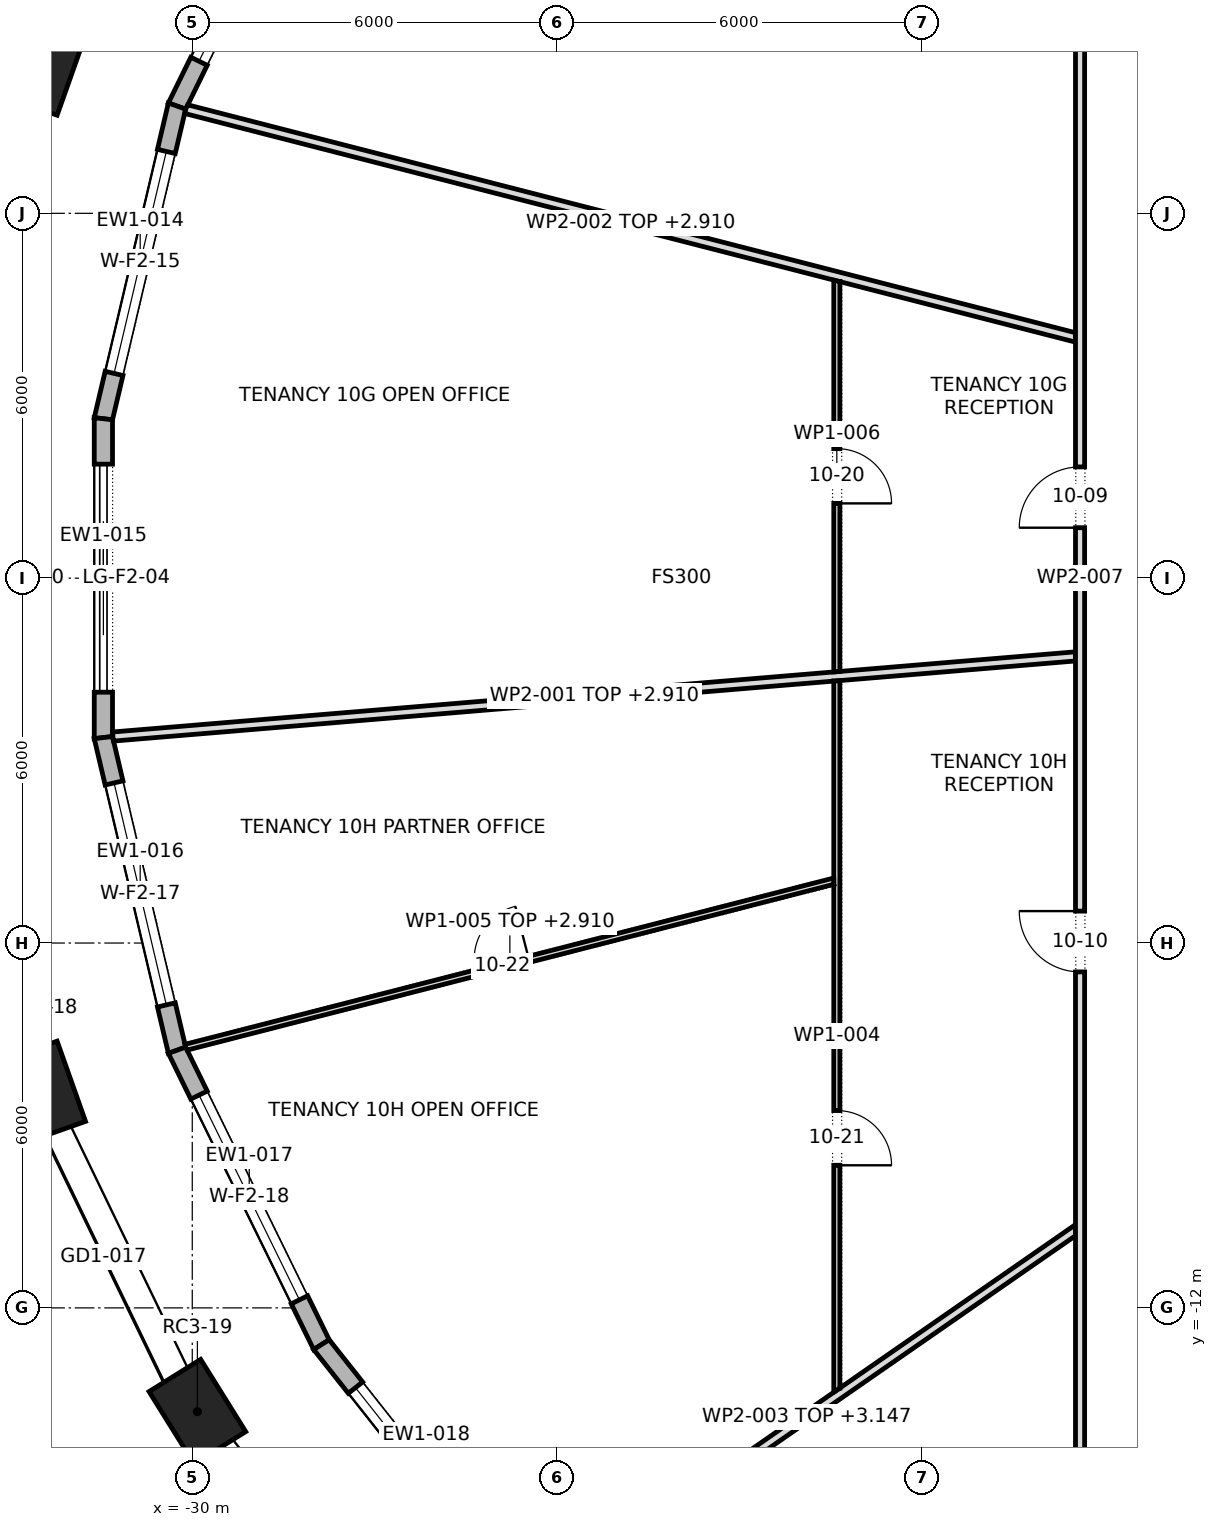
"""IFC4 building model, lengths in metres.
Left out: names, types, materials, properties, quantities, classifications, styles, units other than length and angle.
Written with IfcOpenShell. Run it as: python <this file> out.ifc"""

import sys

from ifc_helpers import new_model, si_unit, direction, frame, frame_2d, origin, origin_2d, place, context, subcontext, project, spatial, polyline, rectangle, outline, extrude, element, fill, save


model = new_model("IFC4")
c1 = context("Model", 3, precision=1e-05, world=origin(), true_north=direction((0.0, 1.0)))
c2 = subcontext(c1, "Body", "Model", "MODEL_VIEW")
j1 = project(units=[si_unit("LENGTHUNIT", "METRE"), si_unit("PLANEANGLEUNIT", "RADIAN")], contexts=[c1])
p1 = place(None, origin())
s1 = spatial("IfcSite", under=j1, at=p1, CompositionType="ELEMENT")
p2 = place(p1, origin())
s2 = spatial("IfcBuilding", under=s1, at=p2, CompositionType="ELEMENT")
p3 = place(p2, frame((0.0, 0.0, 150.7)))
s3 = spatial("IfcBuildingStorey", under=s2, at=p3, CompositionType="ELEMENT", Elevation=150.7)
for number, where, z_axis, x_axis in (
    (1, (-32.46, 8.44, 0.0), (0.0, 0.0, 1.0), (-0.334, -0.943, 0.0)),
    (2, (-32.46, -8.44, 0.0), (0.0, 0.0, 1.0), (0.334, -0.943, 0.0)),
    (3, (-29.916, -13.706, 0.0), (0.0, 0.0, 1.0), (0.529, -0.849, 0.0)),
):
    element("IfcColumn", number, at=place(p3, frame(where, z_axis=z_axis, x_axis=x_axis)), inside=s3, PredefinedType="COLUMN", context=c2, shape_type="SweptSolid", body=[
        extrude(rectangle(XDim=1.4, YDim=1.0, at=origin_2d()), origin(), (0.0, 0.0, 1.0), 4.2),
    ])
p4 = place(p3, frame((-27.876, 12.605, 0.0), z_axis=(0.0, 0.0, 1.0), x_axis=(-0.440373354088, -0.897814740918, 0.0)))
e4 = element("IfcWall", 4, at=p4, inside=s3, PredefinedType="STANDARD", context=c2, shape_type="SweptSolid", body=[
    extrude(outline(polyline([(-0.016, -0.15), (5.409, -0.15), (5.376, 0.15), (0.016, 0.15), (-0.016, -0.15)])), origin(), (0.0, 0.0, 1.0), 3.9),
])
p5 = place(p4, frame((0.821, 0.0, 0.6)))
e5 = element("IfcOpeningElement", 5, at=p5, cuts=e4, PredefinedType="OPENING", context=c2, shape_type="SweptSolid", body=[
    extrude(rectangle(XDim=3.75, YDim=2.85, at=frame_2d((1.875, 1.425))), frame((0.0, 0.162, 0.0), z_axis=(0.0, -1.0, 0.0), x_axis=(1.0, 0.0, 0.0)), (0.0, 0.0, 1.0), 0.324),
])
p6 = place(p3, frame((-30.25, 7.763, 0.0), z_axis=(0.0, 0.0, 1.0), x_axis=(-0.229289208312, -0.973358340464, 0.0)))
e6 = element("IfcWall", 6, at=p6, inside=s3, PredefinedType="STANDARD", context=c2, shape_type="SweptSolid", body=[
    extrude(outline(polyline([(-0.017, -0.15), (5.3, -0.15), (5.265, 0.15), (0.017, 0.15), (-0.017, -0.15)])), origin(), (0.0, 0.0, 1.0), 3.9),
])
p7 = place(p6, frame((0.766, 0.0, 0.6)))
e7 = element("IfcOpeningElement", 7, at=p7, cuts=e6, PredefinedType="OPENING", context=c2, shape_type="SweptSolid", body=[
    extrude(rectangle(XDim=3.75, YDim=2.85, at=frame_2d((1.875, 1.425))), frame((0.0, 0.162, 0.0), z_axis=(0.0, -1.0, 0.0), x_axis=(1.0, 0.0, 0.0)), (0.0, 0.0, 1.0), 0.324),
])
p8 = place(p3, frame((-31.462, 2.622, 0.0), z_axis=(0.0, 0.0, 1.0), x_axis=(0.0, -1.0, 0.0)))
e8 = element("IfcWall", 8, at=p8, inside=s3, PredefinedType="STANDARD", context=c2, shape_type="SweptSolid", body=[
    extrude(outline(polyline([(-0.017, -0.15), (5.26, -0.15), (5.226, 0.15), (0.017, 0.15), (-0.017, -0.15)])), origin(), (0.0, 0.0, 1.0), 3.9),
])
p9 = place(p8, frame((0.747, 0.0, 0.0)))
e9 = element("IfcOpeningElement", 9, at=p9, cuts=e8, PredefinedType="OPENING", context=c2, shape_type="SweptSolid", body=[
    extrude(rectangle(XDim=3.75, YDim=3.45, at=frame_2d((1.875, 1.725))), frame((0.0, 0.162, 0.0), z_axis=(0.0, -1.0, 0.0), x_axis=(1.0, 0.0, 0.0)), (0.0, 0.0, 1.0), 0.324),
])
p10 = place(p3, frame((-31.462, -2.622, 0.0), z_axis=(0.0, 0.0, 1.0), x_axis=(0.229289208312, -0.973358340464, 0.0)))
e10 = element("IfcWall", 10, at=p10, inside=s3, PredefinedType="STANDARD", context=c2, shape_type="SweptSolid", body=[
    extrude(outline(polyline([(-0.017, -0.15), (5.299, -0.15), (5.265, 0.15), (0.017, 0.15), (-0.017, -0.15)])), origin(), (0.0, 0.0, 1.0), 3.9),
])
p11 = place(p10, frame((0.766, 0.0, 0.6)))
e11 = element("IfcOpeningElement", 11, at=p11, cuts=e10, PredefinedType="OPENING", context=c2, shape_type="SweptSolid", body=[
    extrude(rectangle(XDim=3.75, YDim=2.85, at=frame_2d((1.875, 1.425))), frame((0.0, 0.162, 0.0), z_axis=(0.0, -1.0, 0.0), x_axis=(1.0, 0.0, 0.0)), (0.0, 0.0, 1.0), 0.324),
])
p12 = place(p3, frame((-30.25, -7.763, 0.0), z_axis=(0.0, 0.0, 1.0), x_axis=(0.440373354088, -0.897814740918, 0.0)))
e12 = element("IfcWall", 12, at=p12, inside=s3, PredefinedType="STANDARD", context=c2, shape_type="SweptSolid", body=[
    extrude(outline(polyline([(-0.017, -0.15), (5.409, -0.15), (5.376, 0.15), (0.017, 0.15), (-0.017, -0.15)])), origin(), (0.0, 0.0, 1.0), 3.9),
])
p13 = place(p12, frame((0.821, 0.0, 0.6)))
e13 = element("IfcOpeningElement", 13, at=p13, cuts=e12, PredefinedType="OPENING", context=c2, shape_type="SweptSolid", body=[
    extrude(rectangle(XDim=3.75, YDim=2.85, at=frame_2d((1.875, 1.425))), frame((0.0, 0.162, 0.0), z_axis=(0.0, -1.0, 0.0), x_axis=(1.0, 0.0, 0.0)), (0.0, 0.0, 1.0), 0.324),
])
p14 = place(p3, frame((-27.876, -12.605, 0.0), z_axis=(0.0, 0.0, 1.0), x_axis=(0.620520511988, -0.784190215574, 0.0)))
e14 = element("IfcWall", 14, at=p14, inside=s3, PredefinedType="STANDARD", context=c2, shape_type="SweptSolid", body=[
    extrude(outline(polyline([(-0.016, -0.15), (5.569, -0.15), (5.538, 0.15), (0.016, 0.15), (-0.016, -0.15)])), origin(), (0.0, 0.0, 1.0), 3.9),
])
p15 = place(p14, frame((0.902, 0.0, 0.6)))
e15 = element("IfcOpeningElement", 15, at=p15, cuts=e14, PredefinedType="OPENING", context=c2, shape_type="SweptSolid", body=[
    extrude(rectangle(XDim=3.75, YDim=2.85, at=frame_2d((1.875, 1.425))), frame((0.0, 0.162, 0.0), z_axis=(0.0, -1.0, 0.0), x_axis=(1.0, 0.0, 0.0)), (0.0, 0.0, 1.0), 0.324),
])
p16 = place(p3, frame((-31.305, -2.604, 0.0), z_axis=(0.0, 0.0, 1.0), x_axis=(0.996551160003, 0.082980633261, 0.0)))
e16 = element("IfcWall", 16, at=p16, inside=s3, PredefinedType="PARTITIONING", context=c2, shape_type="SweptSolid", body=[
    extrude(outline(polyline([(0.005, -0.075), (1.985, -0.075), (3.966, -0.075), (5.947, -0.075), (7.928, -0.075), (9.909, -0.075), (11.89, -0.075), (11.89, -0.075), (11.891, -0.075), (13.885, -0.075), (15.878, -0.075), (15.89, 0.068), (15.89, 0.075), (13.904, 0.075), (11.918, 0.075), (9.931, 0.075), (7.945, 0.075), (5.959, 0.075), (3.973, 0.075), (1.986, 0.075), (0.0, 0.075), (0.0, -0.044), (0.005, -0.075)])), origin(), (0.0, 0.0, 1.0), 2.91),
])
p17 = place(p3, frame((-30.106, 7.715, 0.0), z_axis=(0.0, 0.0, 1.0), x_axis=(0.968604188178, -0.248607977837, 0.0)))
e17 = element("IfcWall", 17, at=p17, inside=s3, PredefinedType="PARTITIONING", context=c2, shape_type="SweptSolid", body=[
    extrude(outline(polyline([(0.0, -0.075), (1.853, -0.075), (3.707, -0.075), (5.56, -0.075), (7.413, -0.075), (9.267, -0.075), (11.12, -0.075), (11.124, -0.074), (11.124, -0.075), (12.458, -0.075), (13.791, -0.075), (15.124, -0.075), (15.124, -0.073), (15.086, 0.075), (13.202, 0.075), (11.318, 0.075), (9.434, 0.075), (7.55, 0.075), (5.667, 0.075), (3.782, 0.075), (1.898, 0.075), (0.015, 0.075), (0.0, 0.005), (0.0, -0.075)])), origin(), (0.0, 0.0, 1.0), 2.91),
])
p18 = place(p3, frame((-24.324, -16.859, 0.0), z_axis=(0.0, 0.0, 1.0), x_axis=(0.821700462415, 0.569919599652, 0.0)))
e18 = element("IfcWall", 18, at=p18, inside=s3, PredefinedType="PARTITIONING", context=c2, shape_type="SweptSolid", body=[
    extrude(outline(polyline([(0.025, -0.075), (1.807, -0.075), (3.589, -0.075), (5.371, -0.075), (7.153, -0.075), (8.935, -0.075), (10.717, -0.075), (10.82, 0.074), (10.82, 0.075), (9.249, 0.075), (7.677, 0.075), (6.105, 0.075), (6.104, 0.073), (6.102, 0.075), (4.576, 0.075), (3.051, 0.075), (1.525, 0.075), (0.0, 0.075), (0.0, 0.071), (0.004, 0.002), (0.025, -0.075)])), origin(), (0.0, 0.0, 1.0), 3.147),
])
p19 = place(p3, frame((-19.4, -13.387, 0.0), z_axis=(0.0, 0.0, 1.0), x_axis=(0.0, 1.0, 0.0)))
e19 = element("IfcWall", 19, at=p19, inside=s3, PredefinedType="PARTITIONING", context=c2, shape_type="SweptSolid", body=[
    extrude(outline(polyline([(11.703, -0.05), (11.703, -0.046), (11.695, 0.05), (10.028, 0.05), (8.361, 0.05), (8.354, 0.048), (8.353, 0.05), (6.682, 0.05), (5.012, 0.05), (3.341, 0.05), (1.671, 0.05), (0.0, 0.05), (0.0, 0.05), (0.069, -0.05), (2.008, -0.05), (3.947, -0.05), (5.886, -0.05), (7.825, -0.05), (9.764, -0.05), (11.703, -0.05)])), origin(), (0.0, 0.0, 1.0), 3.9),
])
p20 = place(p19, frame((3.732, 0.0, 0.0)))
e20 = element("IfcOpeningElement", 20, at=p20, cuts=e19, PredefinedType="OPENING", context=c2, shape_type="SweptSolid", body=[
    extrude(rectangle(XDim=0.9, YDim=2.1, at=frame_2d((0.45, 1.05))), frame((0.0, 0.062, 0.0), z_axis=(0.0, -1.0, 0.0), x_axis=(1.0, 0.0, 0.0)), (0.0, 0.0, 1.0), 0.124),
])
p21 = place(p3, frame((-19.438, -4.98, 0.0), z_axis=(0.0, 0.0, 1.0), x_axis=(-0.968675214927, -0.248331085419, 0.0)))
e21 = element("IfcWall", 21, at=p21, inside=s3, PredefinedType="PARTITIONING", context=c2, shape_type="SweptSolid", body=[
    extrude(outline(polyline([(11.014, -0.05), (11.014, 0.002), (11.004, 0.05), (9.174, 0.05), (7.344, 0.05), (5.515, 0.05), (3.685, 0.05), (1.855, 0.05), (0.025, 0.05), (0.0, -0.049), (0.0, -0.05), (1.836, -0.05), (3.671, -0.05), (5.507, -0.05), (7.343, -0.05), (9.178, -0.05), (11.014, -0.05)])), origin(), (0.0, 0.0, 1.0), 2.91),
])
p22 = place(p21, frame((5.189, 0.0, 0.0)))
e22 = element("IfcOpeningElement", 22, at=p22, cuts=e21, PredefinedType="OPENING", context=c2, shape_type="SweptSolid", body=[
    extrude(rectangle(XDim=0.9, YDim=2.1, at=frame_2d((0.45, 1.05))), frame((0.0, 0.062, 0.0), z_axis=(0.0, -1.0, 0.0), x_axis=(1.0, 0.0, 0.0)), (0.0, 0.0, 1.0), 0.124),
])
p23 = place(p3, frame((-19.4, -1.542, 0.0), z_axis=(0.0, 0.0, 1.0), x_axis=(0.0, 1.0, 0.0)))
e23 = element("IfcWall", 23, at=p23, inside=s3, PredefinedType="PARTITIONING", context=c2, shape_type="SweptSolid", body=[
    extrude(outline(polyline([(0.008, -0.05), (1.611, -0.05), (3.213, -0.05), (4.816, -0.05), (6.418, -0.05), (6.444, 0.05), (4.833, 0.05), (3.222, 0.05), (1.611, 0.05), (0.0, 0.05), (0.0, 0.05), (0.008, -0.05)])), origin(), (0.0, 0.0, 1.0), 3.9),
])
p24 = place(p23, frame((2.772, 0.0, 0.0)))
e24 = element("IfcOpeningElement", 24, at=p24, cuts=e23, PredefinedType="OPENING", context=c2, shape_type="SweptSolid", body=[
    extrude(rectangle(XDim=0.9, YDim=2.1, at=frame_2d((0.45, 1.05))), frame((0.0, 0.062, 0.0), z_axis=(0.0, -1.0, 0.0), x_axis=(1.0, 0.0, 0.0)), (0.0, 0.0, 1.0), 0.124),
])
p25 = place(p3, frame((-15.4, -15.475, 0.0), z_axis=(0.0, 0.0, 1.0), x_axis=(0.0, 1.0, 0.0)))
e25 = element("IfcWall", 25, at=p25, inside=s3, PredefinedType="PARTITIONING", context=c2, shape_type="SweptSolid", body=[
    extrude(outline(polyline([(0.15, -0.075), (2.066, -0.075), (3.981, -0.075), (5.897, -0.075), (7.812, -0.075), (9.728, -0.075), (11.644, -0.075), (13.56, -0.075), (15.475, -0.075), (17.391, -0.075), (19.306, -0.075), (21.222, -0.075), (23.138, -0.075), (25.053, -0.075), (26.969, -0.075), (28.885, -0.075), (30.8, -0.075), (30.95, 0.075), (29.016, 0.075), (27.081, 0.075), (25.147, 0.075), (23.212, 0.075), (21.278, 0.075), (19.344, 0.075), (17.409, 0.075), (15.475, 0.075), (13.541, 0.075), (11.606, 0.075), (9.672, 0.075), (7.738, 0.075), (5.803, 0.075), (3.869, 0.075), (1.935, 0.075), (0.0, 0.075), (0.15, -0.075)])), origin(), (0.0, 0.0, 1.0), 3.9),
])
p26 = place(p25, frame((24.245, 0.0, 0.0)))
e26 = element("IfcOpeningElement", 26, at=p26, cuts=e25, PredefinedType="OPENING", context=c2, shape_type="SweptSolid", body=[
    extrude(rectangle(XDim=1.8, YDim=2.1, at=frame_2d((0.9, 1.05))), frame((0.0, 0.087, 0.0), z_axis=(0.0, -1.0, 0.0), x_axis=(1.0, 0.0, 0.0)), (0.0, 0.0, 1.0), 0.174),
])
p27 = place(p25, frame((16.305, 0.0, 0.0)))
e27 = element("IfcOpeningElement", 27, at=p27, cuts=e25, PredefinedType="OPENING", context=c2, shape_type="SweptSolid", body=[
    extrude(rectangle(XDim=1.0, YDim=2.1, at=frame_2d((0.5, 1.05))), frame((0.0, 0.087, 0.0), z_axis=(0.0, -1.0, 0.0), x_axis=(1.0, 0.0, 0.0)), (0.0, 0.0, 1.0), 0.174),
])
p28 = place(p25, frame((9.0, 0.0, 0.0)))
e28 = element("IfcOpeningElement", 28, at=p28, cuts=e25, PredefinedType="OPENING", context=c2, shape_type="SweptSolid", body=[
    extrude(rectangle(XDim=1.0, YDim=2.1, at=frame_2d((0.5, 1.05))), frame((0.0, 0.087, 0.0), z_axis=(0.0, -1.0, 0.0), x_axis=(1.0, 0.0, 0.0)), (0.0, 0.0, 1.0), 0.174),
])
p29 = place(p5, origin())
e29 = element("IfcWindow", 29, at=p29, inside=s3, PartitioningType="TRIPLE_PANEL_VERTICAL", PredefinedType="WINDOW", context=c2, shape_type="SweptSolid", body=[
    extrude(rectangle(XDim=3.75, YDim=2.85, at=frame_2d((1.875, 1.425))), frame((0.0, 0.03, 0.0), z_axis=(0.0, -1.0, 0.0), x_axis=(1.0, 0.0, 0.0)), (0.0, 0.0, 1.0), 0.06),
])
fill(e5, e29)
p30 = place(p7, origin())
e30 = element("IfcWindow", 30, at=p30, inside=s3, PartitioningType="TRIPLE_PANEL_VERTICAL", PredefinedType="WINDOW", context=c2, shape_type="SweptSolid", body=[
    extrude(rectangle(XDim=3.75, YDim=2.85, at=frame_2d((1.875, 1.425))), frame((0.0, 0.03, 0.0), z_axis=(0.0, -1.0, 0.0), x_axis=(1.0, 0.0, 0.0)), (0.0, 0.0, 1.0), 0.06),
])
fill(e7, e30)
p31 = place(p9, origin())
e31 = element("IfcDoor", 31, at=p31, inside=s3, OperationType="DOUBLE_DOOR_SLIDING", PredefinedType="DOOR", context=c2, shape_type="SweptSolid", body=[
    extrude(rectangle(XDim=3.75, YDim=3.45, at=frame_2d((1.875, 1.725))), frame((0.0, 0.025, 0.0), z_axis=(0.0, -1.0, 0.0), x_axis=(1.0, 0.0, 0.0)), (0.0, 0.0, 1.0), 0.05),
])
fill(e9, e31)
p32 = place(p11, origin())
e32 = element("IfcWindow", 32, at=p32, inside=s3, PartitioningType="TRIPLE_PANEL_VERTICAL", PredefinedType="WINDOW", context=c2, shape_type="SweptSolid", body=[
    extrude(rectangle(XDim=3.75, YDim=2.85, at=frame_2d((1.875, 1.425))), frame((0.0, 0.03, 0.0), z_axis=(0.0, -1.0, 0.0), x_axis=(1.0, 0.0, 0.0)), (0.0, 0.0, 1.0), 0.06),
])
fill(e11, e32)
p33 = place(p13, origin())
e33 = element("IfcWindow", 33, at=p33, inside=s3, PartitioningType="TRIPLE_PANEL_VERTICAL", PredefinedType="WINDOW", context=c2, shape_type="SweptSolid", body=[
    extrude(rectangle(XDim=3.75, YDim=2.85, at=frame_2d((1.875, 1.425))), frame((0.0, 0.03, 0.0), z_axis=(0.0, -1.0, 0.0), x_axis=(1.0, 0.0, 0.0)), (0.0, 0.0, 1.0), 0.06),
])
fill(e13, e33)
p34 = place(p15, origin())
e34 = element("IfcWindow", 34, at=p34, inside=s3, PartitioningType="TRIPLE_PANEL_VERTICAL", PredefinedType="WINDOW", context=c2, shape_type="SweptSolid", body=[
    extrude(rectangle(XDim=3.75, YDim=2.85, at=frame_2d((1.875, 1.425))), frame((0.0, 0.03, 0.0), z_axis=(0.0, -1.0, 0.0), x_axis=(1.0, 0.0, 0.0)), (0.0, 0.0, 1.0), 0.06),
])
fill(e15, e34)
p35 = place(p27, origin())
e35 = element("IfcDoor", 35, at=p35, inside=s3, OperationType="SINGLE_SWING_RIGHT", PredefinedType="DOOR", context=c2, shape_type="SweptSolid", body=[
    extrude(rectangle(XDim=1.0, YDim=2.1, at=frame_2d((0.5, 1.05))), frame((0.0, 0.025, 0.0), z_axis=(0.0, -1.0, 0.0), x_axis=(1.0, 0.0, 0.0)), (0.0, 0.0, 1.0), 0.05),
])
fill(e27, e35)
p36 = place(p28, origin())
e36 = element("IfcDoor", 36, at=p36, inside=s3, OperationType="SINGLE_SWING_LEFT", PredefinedType="DOOR", context=c2, shape_type="SweptSolid", body=[
    extrude(rectangle(XDim=1.0, YDim=2.1, at=frame_2d((0.5, 1.05))), frame((0.0, 0.025, 0.0), z_axis=(0.0, -1.0, 0.0), x_axis=(1.0, 0.0, 0.0)), (0.0, 0.0, 1.0), 0.05),
])
fill(e28, e36)
p37 = place(p24, frame((0.9, 0.0, 0.0), z_axis=(0.0, 0.0, 1.0), x_axis=(-1.0, 0.0, 0.0)))
e37 = element("IfcDoor", 37, at=p37, inside=s3, OperationType="SINGLE_SWING_LEFT", PredefinedType="DOOR", context=c2, shape_type="SweptSolid", body=[
    extrude(rectangle(XDim=0.9, YDim=2.1, at=frame_2d((0.45, 1.05))), frame((0.0, 0.025, 0.0), z_axis=(0.0, -1.0, 0.0), x_axis=(1.0, 0.0, 0.0)), (0.0, 0.0, 1.0), 0.05),
])
fill(e24, e37)
p38 = place(p20, frame((0.9, 0.0, 0.0), z_axis=(0.0, 0.0, 1.0), x_axis=(-1.0, 0.0, 0.0)))
e38 = element("IfcDoor", 38, at=p38, inside=s3, OperationType="SINGLE_SWING_LEFT", PredefinedType="DOOR", context=c2, shape_type="SweptSolid", body=[
    extrude(rectangle(XDim=0.9, YDim=2.1, at=frame_2d((0.45, 1.05))), frame((0.0, 0.025, 0.0), z_axis=(0.0, -1.0, 0.0), x_axis=(1.0, 0.0, 0.0)), (0.0, 0.0, 1.0), 0.05),
])
fill(e20, e38)
p39 = place(p22, frame((0.9, 0.0, 0.0), z_axis=(0.0, 0.0, 1.0), x_axis=(-1.0, 0.0, 0.0)))
e39 = element("IfcDoor", 39, at=p39, inside=s3, OperationType="SINGLE_SWING_LEFT", PredefinedType="DOOR", context=c2, shape_type="SweptSolid", body=[
    extrude(rectangle(XDim=0.9, YDim=2.1, at=frame_2d((0.45, 1.05))), frame((0.0, 0.025, 0.0), z_axis=(0.0, -1.0, 0.0), x_axis=(1.0, 0.0, 0.0)), (0.0, 0.0, 1.0), 0.05),
])
fill(e22, e39)
save(model, sys.argv[1])
